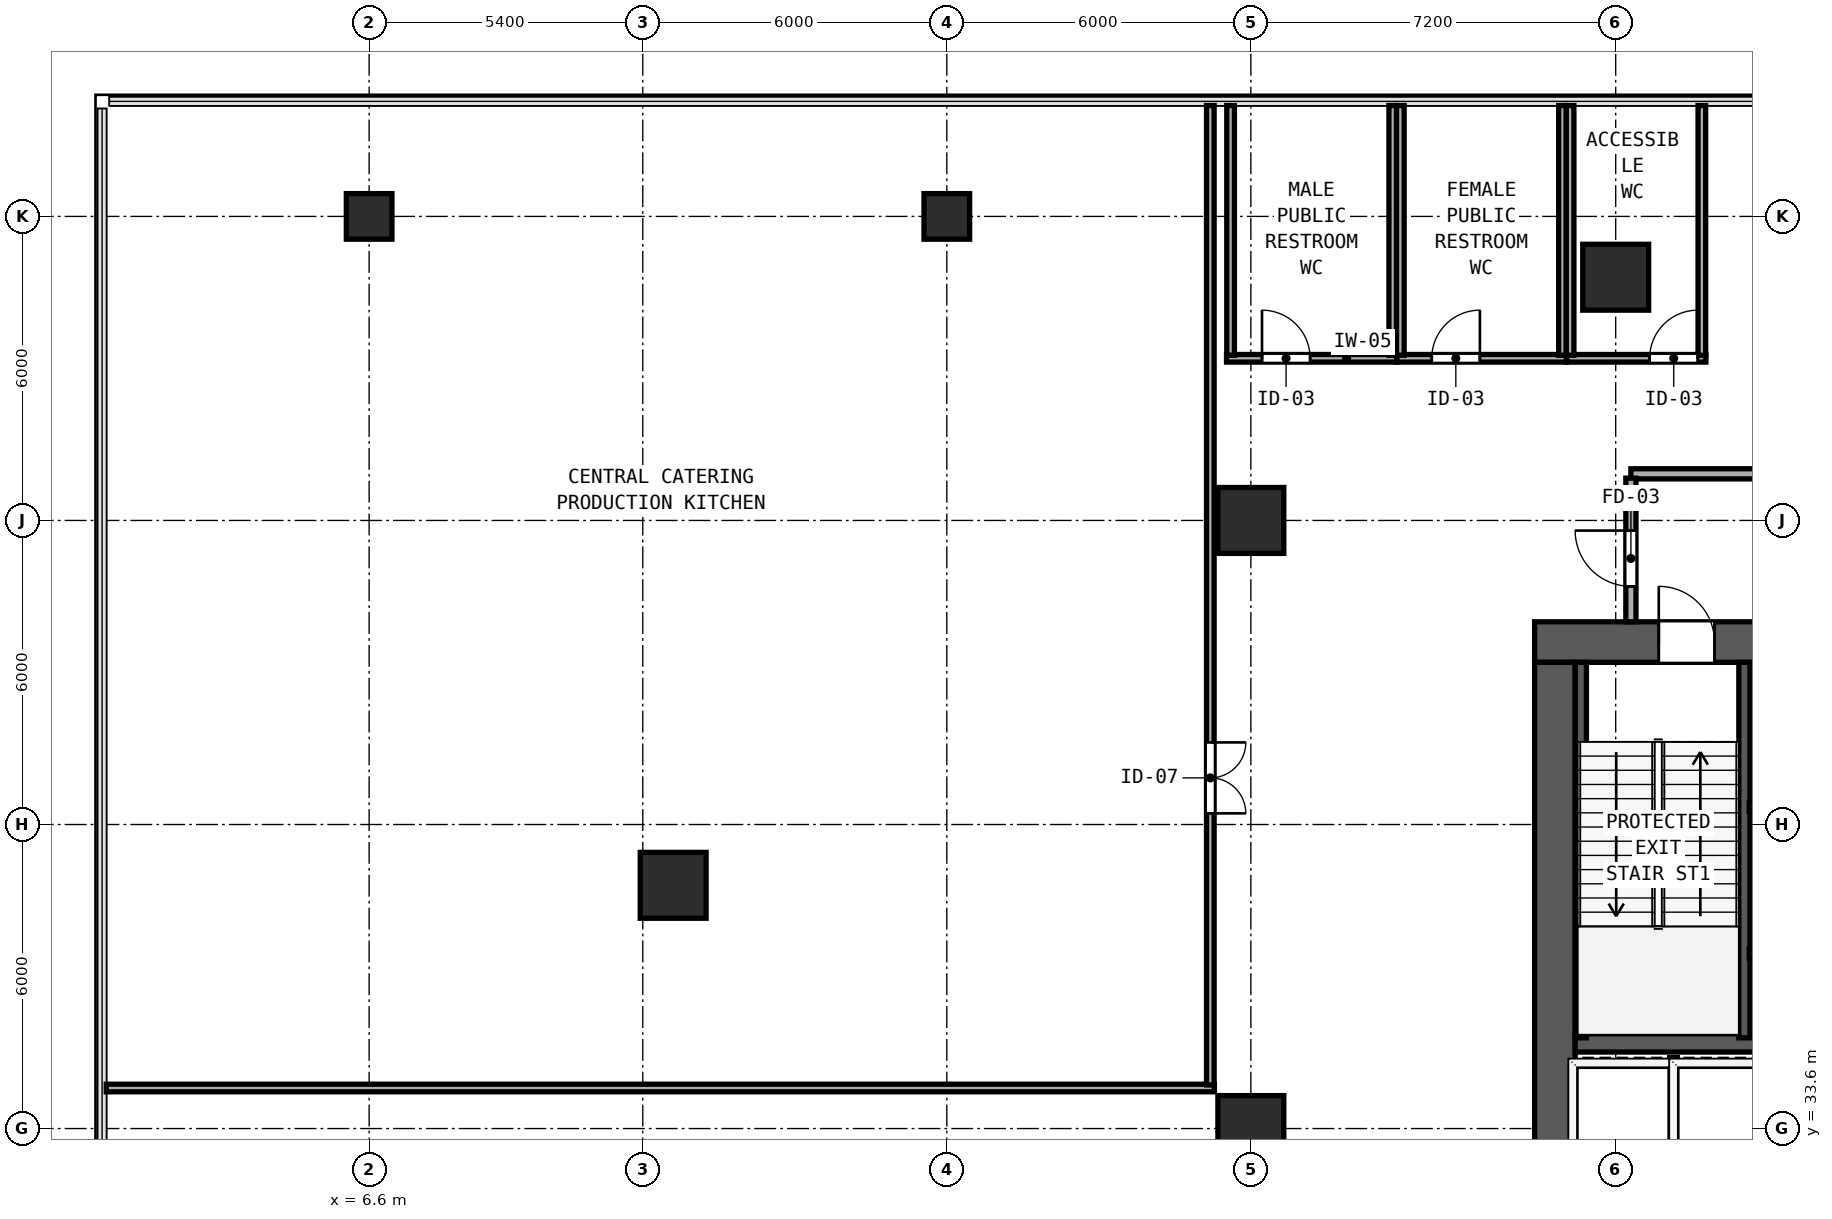
"""IFC4 building model, lengths in metres.
Left out: names, types, materials, properties, quantities, classifications, styles, units other than length and angle.
Written with IfcOpenShell. Run it as: python <this file> out.ifc"""

import sys

from ifc_helpers import new_model, si_unit, direction, frame, frame_2d, origin, origin_2d, place, context, subcontext, project, spatial, rectangle, hollow_rectangle, extrude, element, fill, save


model = new_model("IFC4")
c1 = context("Model", 3, precision=1e-05, world=origin(), true_north=direction((0.0, 1.0)))
c2 = subcontext(c1, "Body", "Model", "MODEL_VIEW")
j1 = project(units=[si_unit("LENGTHUNIT", "METRE"), si_unit("PLANEANGLEUNIT", "RADIAN")], contexts=[c1])
p1 = place(None, origin())
s1 = spatial("IfcSite", under=j1, at=p1, CompositionType="ELEMENT")
p2 = place(p1, origin())
s2 = spatial("IfcBuilding", under=s1, at=p2, CompositionType="ELEMENT")
p3 = place(p2, frame((0.0, 0.0, 5.4)))
s3 = spatial("IfcBuildingStorey", under=s2, at=p3, CompositionType="ELEMENT", Elevation=5.4)
p4 = place(p3, frame((29.6, 43.2, 0.0), z_axis=(0.0, 0.0, 1.0), x_axis=(1.0, 0.0, 0.0)))
e1 = element("IfcWall", 1, at=p4, inside=s3, PredefinedType="SHEAR", context=c2, shape_type="SweptSolid", body=[
    extrude(rectangle(XDim=17.6, YDim=0.8, at=frame_2d((8.8, 0.0))), origin(), (0.0, 0.0, 1.0), 4.56),
])
p5 = place(p4, frame((2.45, 0.0, 0.0)))
e2 = element("IfcOpeningElement", 2, at=p5, cuts=e1, PredefinedType="OPENING", context=c2, shape_type="SweptSolid", body=[
    extrude(rectangle(XDim=1.1, YDim=2.15, at=frame_2d((0.55, 1.075))), frame((0.0, 0.41, 0.0), z_axis=(0.0, -1.0, 0.0), x_axis=(1.0, 0.0, 0.0)), (0.0, 0.0, 1.0), 0.82),
])
p6 = place(p4, frame((7.56, 0.0, 0.0)))
e3 = element("IfcOpeningElement", 3, at=p6, cuts=e1, PredefinedType="OPENING", context=c2, shape_type="SweptSolid", body=[
    extrude(rectangle(XDim=1.1, YDim=2.15, at=frame_2d((0.55, 1.075))), frame((0.0, 0.41, 0.0), z_axis=(0.0, -1.0, 0.0), x_axis=(1.0, 0.0, 0.0)), (0.0, 0.0, 1.0), 0.82),
])
p7 = place(p4, frame((13.65, 0.0, 0.0)))
e4 = element("IfcOpeningElement", 4, at=p7, cuts=e1, PredefinedType="OPENING", context=c2, shape_type="SweptSolid", body=[
    extrude(rectangle(XDim=1.1, YDim=2.15, at=frame_2d((0.55, 1.075))), frame((0.0, 0.41, 0.0), z_axis=(0.0, -1.0, 0.0), x_axis=(1.0, 0.0, 0.0)), (0.0, 0.0, 1.0), 0.82),
])
p8 = place(p4, frame((4.78, 0.0, 0.0)))
e5 = element("IfcOpeningElement", 5, at=p8, cuts=e1, PredefinedType="OPENING", context=c2, shape_type="SweptSolid", body=[
    extrude(rectangle(XDim=1.1, YDim=2.2, at=frame_2d((0.55, 1.1))), frame((0.0, 0.41, 0.0), z_axis=(0.0, -1.0, 0.0), x_axis=(1.0, 0.0, 0.0)), (0.0, 0.0, 1.0), 0.82),
])
p9 = place(p4, frame((11.14, 0.0, 0.0)))
e6 = element("IfcOpeningElement", 6, at=p9, cuts=e1, PredefinedType="OPENING", context=c2, shape_type="SweptSolid", body=[
    extrude(rectangle(XDim=1.1, YDim=2.2, at=frame_2d((0.55, 1.1))), frame((0.0, 0.41, 0.0), z_axis=(0.0, -1.0, 0.0), x_axis=(1.0, 0.0, 0.0)), (0.0, 0.0, 1.0), 0.82),
])
p10 = place(p3, frame((30.0, 32.8, 0.0), z_axis=(0.0, 0.0, 1.0), x_axis=(0.0, 1.0, 0.0)))
e7 = element("IfcWall", 7, at=p10, inside=s3, PredefinedType="SHEAR", context=c2, shape_type="SweptSolid", body=[
    extrude(rectangle(XDim=10.0, YDim=0.8, at=frame_2d((5.0, 0.0))), origin(), (0.0, 0.0, 1.0), 4.56),
])
p11 = place(p3, frame((30.4, 35.29, 0.0), z_axis=(0.0, 0.0, 1.0), x_axis=(1.0, 0.0, 0.0)))
e8 = element("IfcWall", 8, at=p11, inside=s3, PredefinedType="SHEAR", context=c2, shape_type="SweptSolid", body=[
    extrude(rectangle(XDim=16.0, YDim=0.36, at=frame_2d((8.0, 0.0))), origin(), (0.0, 0.0, 1.0), 4.56),
])
p12 = place(p11, frame((4.95, 0.0, 0.0), z_axis=(0.0, 0.0, 1.0), x_axis=(-1.0, 0.0, 0.0)))
e9 = element("IfcOpeningElement", 9, at=p12, cuts=e8, PredefinedType="OPENING", context=c2, shape_type="SweptSolid", body=[
    extrude(rectangle(XDim=0.9, YDim=2.1, at=frame_2d((0.45, 1.05))), frame((0.0, 0.19, 0.0), z_axis=(0.0, -1.0, 0.0), x_axis=(1.0, 0.0, 0.0)), (0.0, 0.0, 1.0), 0.38),
])
p13 = place(p11, frame((12.01, 0.0, 0.0), z_axis=(0.0, 0.0, 1.0), x_axis=(-1.0, 0.0, 0.0)))
e10 = element("IfcOpeningElement", 10, at=p13, cuts=e8, PredefinedType="OPENING", context=c2, shape_type="SweptSolid", body=[
    extrude(rectangle(XDim=0.9, YDim=2.1, at=frame_2d((0.45, 1.05))), frame((0.0, 0.19, 0.0), z_axis=(0.0, -1.0, 0.0), x_axis=(1.0, 0.0, 0.0)), (0.0, 0.0, 1.0), 0.38),
])
for number, where, z_axis, x_axis in (
    (11, (30.512, 35.39, 0.0), (0.0, 0.0, 1.0), (0.0, 1.0, 0.0)),
    (12, (33.74, 35.39, 0.0), (0.0, 0.0, 1.0), (0.0, 1.0, 0.0)),
):
    element("IfcWall", number, at=place(p3, frame(where, z_axis=z_axis, x_axis=x_axis)), inside=s3, PredefinedType="SHEAR", context=c2, shape_type="SweptSolid", body=[
        extrude(rectangle(XDim=7.41, YDim=0.22, at=frame_2d((3.705, 0.0))), origin(), (0.0, 0.0, 1.0), 4.56),
    ])
for number, where, z_axis, x_axis in (
    (13, (24.0, 33.6, 0.0), (0.0, 0.0, 1.0), (1.0, 0.0, 0.0)),
    (14, (24.0, 45.6, 0.0), (0.0, 0.0, 1.0), (1.0, 0.0, 0.0)),
    (15, (31.2, 50.4, 0.0), (0.0, 0.0, 1.0), (1.0, 0.0, 0.0)),
    (16, (12.6, 38.4, 0.0), (0.0, 0.0, 1.0), (1.0, 0.0, 0.0)),
):
    element("IfcColumn", number, at=place(p3, frame(where, z_axis=z_axis, x_axis=x_axis)), inside=s3, PredefinedType="COLUMN", context=c2, shape_type="SweptSolid", body=[
        extrude(hollow_rectangle(XDim=1.3, YDim=1.3, WallThickness=0.048, at=origin_2d()), origin(), (0.0, 0.0, 1.0), 4.8),
    ])
for number, where, z_axis, x_axis in (
    (17, (6.6, 51.6, 0.0), (0.0, 0.0, 1.0), (1.0, 0.0, 0.0)),
    (18, (18.0, 51.6, 0.0), (0.0, 0.0, 1.0), (1.0, 0.0, 0.0)),
):
    element("IfcColumn", number, at=place(p3, frame(where, z_axis=z_axis, x_axis=x_axis)), inside=s3, PredefinedType="COLUMN", context=c2, shape_type="SweptSolid", body=[
        extrude(rectangle(XDim=0.9, YDim=0.9, at=origin_2d()), origin(), (0.0, 0.0, 1.0), 4.8),
    ])
p14 = place(p3, frame((31.5, 46.52, 0.0), z_axis=(0.0, 0.0, 1.0), x_axis=(1.0, 0.0, 0.0)))
e19 = element("IfcWall", 19, at=p14, inside=s3, PredefinedType="SOLIDWALL", context=c2, shape_type="SweptSolid", body=[
    extrude(rectangle(XDim=13.8, YDim=0.2, at=frame_2d((6.9, 0.0))), origin(), (0.0, 0.0, 1.0), 4.56),
])
p15 = place(p3, frame((31.5, 43.6, 0.0), z_axis=(0.0, 0.0, 1.0), x_axis=(0.0, 1.0, 0.0)))
e20 = element("IfcWall", 20, at=p15, inside=s3, PredefinedType="SOLIDWALL", context=c2, shape_type="SweptSolid", body=[
    extrude(rectangle(XDim=2.835, YDim=0.2, at=frame_2d((1.417, 0.0))), origin(), (0.0, 0.0, 1.0), 4.56),
])
p16 = place(p15, frame((1.8, 0.0, 0.0), z_axis=(0.0, 0.0, 1.0), x_axis=(-1.0, 0.0, 0.0)))
e21 = element("IfcOpeningElement", 21, at=p16, cuts=e20, PredefinedType="OPENING", context=c2, shape_type="SweptSolid", body=[
    extrude(rectangle(XDim=1.1, YDim=2.15, at=frame_2d((0.55, 1.075))), frame((0.0, 0.11, 0.0), z_axis=(0.0, -1.0, 0.0), x_axis=(1.0, 0.0, 0.0)), (0.0, 0.0, 1.0), 0.22),
])
p17 = place(p3, frame((33.835, 39.95, 0.0), z_axis=(0.0, 0.0, 1.0), x_axis=(1.0, 0.0, 0.0)))
e22 = element("IfcWall", 22, at=p17, inside=s3, PredefinedType="SOLIDWALL", context=c2, shape_type="SweptSolid", body=[
    extrude(rectangle(XDim=2.77, YDim=0.18, at=frame_2d((1.385, 0.0))), origin(), (0.0, 0.0, 1.0), 4.56),
])
p18 = place(p3, frame((33.835, 37.05, 0.0), z_axis=(0.0, 0.0, 1.0), x_axis=(1.0, 0.0, 0.0)))
e23 = element("IfcWall", 23, at=p18, inside=s3, PredefinedType="SOLIDWALL", context=c2, shape_type="SweptSolid", body=[
    extrude(rectangle(XDim=2.77, YDim=0.18, at=frame_2d((1.385, 0.0))), origin(), (0.0, 0.0, 1.0), 4.56),
])
p19 = place(p18, frame((1.945, 0.0, 0.0), z_axis=(0.0, 0.0, 1.0), x_axis=(-1.0, 0.0, 0.0)))
e24 = element("IfcOpeningElement", 24, at=p19, cuts=e23, PredefinedType="OPENING", context=c2, shape_type="SweptSolid", body=[
    extrude(rectangle(XDim=1.2, YDim=2.2, at=frame_2d((0.6, 1.1))), frame((0.0, 0.1, 0.0), z_axis=(0.0, -1.0, 0.0), x_axis=(1.0, 0.0, 0.0)), (0.0, 0.0, 1.0), 0.2),
])
p20 = place(p3, frame((32.34, 32.95, 0.0), z_axis=(0.0, 0.0, 1.0), x_axis=(0.0, 1.0, 0.0)))
e25 = element("IfcWall", 25, at=p20, inside=s3, PredefinedType="SOLIDWALL", context=c2, shape_type="SweptSolid", body=[
    extrude(rectangle(XDim=2.05, YDim=0.15, at=frame_2d((1.025, 0.0))), origin(), (0.0, 0.0, 1.0), 4.56),
])
p21 = place(p3, frame((23.52, 48.8, 0.0), z_axis=(0.0, 0.0, 1.0), x_axis=(1.0, 0.0, 0.0)))
e26 = element("IfcWall", 26, at=p21, inside=s3, PredefinedType="PARTITIONING", context=c2, shape_type="SweptSolid", body=[
    extrude(rectangle(XDim=3.36, YDim=0.15, at=frame_2d((1.68, 0.0))), origin(), (0.0, 0.0, 1.0), 4.56),
])
p22 = place(p21, frame((0.7, 0.0, 0.0)))
e27 = element("IfcOpeningElement", 27, at=p22, cuts=e26, PredefinedType="OPENING", context=c2, shape_type="SweptSolid", body=[
    extrude(rectangle(XDim=0.95, YDim=2.12, at=frame_2d((0.475, 1.06))), frame((0.0, 0.085, 0.0), z_axis=(0.0, -1.0, 0.0), x_axis=(1.0, 0.0, 0.0)), (0.0, 0.0, 1.0), 0.17),
])
for number, where, z_axis, x_axis in (
    (28, (23.6, 48.86, 0.0), (0.0, 0.0, 1.0), (0.0, 1.0, 0.0)),
    (29, (26.8, 48.86, 0.0), (0.0, 0.0, 1.0), (0.0, 1.0, 0.0)),
):
    element("IfcWall", number, at=place(p3, frame(where, z_axis=z_axis, x_axis=x_axis)), inside=s3, PredefinedType="PARTITIONING", context=c2, shape_type="SweptSolid", body=[
        extrude(rectangle(XDim=4.928, YDim=0.15, at=frame_2d((2.464, 0.0))), origin(), (0.0, 0.0, 1.0), 4.56),
    ])
p23 = place(p3, frame((26.882, 48.8, 0.0), z_axis=(0.0, 0.0, 1.0), x_axis=(1.0, 0.0, 0.0)))
e30 = element("IfcWall", 30, at=p23, inside=s3, PredefinedType="PARTITIONING", context=c2, shape_type="SweptSolid", body=[
    extrude(rectangle(XDim=3.348, YDim=0.15, at=frame_2d((1.674, 0.0))), origin(), (0.0, 0.0, 1.0), 4.56),
])
p24 = place(p23, frame((0.688, 0.0, 0.0)))
e31 = element("IfcOpeningElement", 31, at=p24, cuts=e30, PredefinedType="OPENING", context=c2, shape_type="SweptSolid", body=[
    extrude(rectangle(XDim=0.95, YDim=2.12, at=frame_2d((0.475, 1.06))), frame((0.0, 0.085, 0.0), z_axis=(0.0, -1.0, 0.0), x_axis=(1.0, 0.0, 0.0)), (0.0, 0.0, 1.0), 0.17),
])
for number, where, z_axis, x_axis in (
    (32, (26.95, 48.86, 0.0), (0.0, 0.0, 1.0), (0.0, 1.0, 0.0)),
    (33, (30.15, 48.86, 0.0), (0.0, 0.0, 1.0), (0.0, 1.0, 0.0)),
):
    element("IfcWall", number, at=place(p3, frame(where, z_axis=z_axis, x_axis=x_axis)), inside=s3, PredefinedType="PARTITIONING", context=c2, shape_type="SweptSolid", body=[
        extrude(rectangle(XDim=4.928, YDim=0.15, at=frame_2d((2.464, 0.0))), origin(), (0.0, 0.0, 1.0), 4.56),
    ])
p25 = place(p3, frame((30.232, 48.8, 0.0), z_axis=(0.0, 0.0, 1.0), x_axis=(1.0, 0.0, 0.0)))
e34 = element("IfcWall", 34, at=p25, inside=s3, PredefinedType="PARTITIONING", context=c2, shape_type="SweptSolid", body=[
    extrude(rectangle(XDim=2.748, YDim=0.15, at=frame_2d((1.374, 0.0))), origin(), (0.0, 0.0, 1.0), 4.56),
])
p26 = place(p25, frame((1.638, 0.0, 0.0)))
e35 = element("IfcOpeningElement", 35, at=p26, cuts=e34, PredefinedType="OPENING", context=c2, shape_type="SweptSolid", body=[
    extrude(rectangle(XDim=0.95, YDim=2.12, at=frame_2d((0.475, 1.06))), frame((0.0, 0.085, 0.0), z_axis=(0.0, -1.0, 0.0), x_axis=(1.0, 0.0, 0.0)), (0.0, 0.0, 1.0), 0.17),
])
for number, where, z_axis, x_axis in (
    (36, (30.3, 48.86, 0.0), (0.0, 0.0, 1.0), (0.0, 1.0, 0.0)),
    (37, (32.9, 48.86, 0.0), (0.0, 0.0, 1.0), (0.0, 1.0, 0.0)),
):
    element("IfcWall", number, at=place(p3, frame(where, z_axis=z_axis, x_axis=x_axis)), inside=s3, PredefinedType="PARTITIONING", context=c2, shape_type="SweptSolid", body=[
        extrude(rectangle(XDim=4.928, YDim=0.15, at=frame_2d((2.464, 0.0))), origin(), (0.0, 0.0, 1.0), 4.56),
    ])
p27 = place(p3, frame((1.412, 34.4, 0.0), z_axis=(0.0, 0.0, 1.0), x_axis=(1.0, 0.0, 0.0)))
e38 = element("IfcWall", 38, at=p27, inside=s3, PredefinedType="PARTITIONING", context=c2, shape_type="SweptSolid", body=[
    extrude(rectangle(XDim=21.868, YDim=0.15, at=frame_2d((10.934, 0.0))), origin(), (0.0, 0.0, 1.0), 4.56),
])
p28 = place(p3, frame((23.2, 34.46, 0.0), z_axis=(0.0, 0.0, 1.0), x_axis=(0.0, 1.0, 0.0)))
e39 = element("IfcWall", 39, at=p28, inside=s3, PredefinedType="PARTITIONING", context=c2, shape_type="SweptSolid", body=[
    extrude(rectangle(XDim=19.328, YDim=0.15, at=frame_2d((9.664, 0.0))), origin(), (0.0, 0.0, 1.0), 4.56),
])
p29 = place(p28, frame((6.76, 0.0, 0.0), z_axis=(0.0, 0.0, 1.0), x_axis=(-1.0, 0.0, 0.0)))
e40 = element("IfcOpeningElement", 40, at=p29, cuts=e39, PredefinedType="OPENING", context=c2, shape_type="SweptSolid", body=[
    extrude(rectangle(XDim=1.4, YDim=2.18, at=frame_2d((0.7, 1.09))), frame((0.0, 0.085, 0.0), z_axis=(0.0, -1.0, 0.0), x_axis=(1.0, 0.0, 0.0)), (0.0, 0.0, 1.0), 0.17),
])
p30 = place(p5, origin())
e41 = element("IfcDoor", 41, at=p30, inside=s3, OperationType="SINGLE_SWING_LEFT", PredefinedType="DOOR", context=c2, shape_type="SweptSolid", body=[
    extrude(rectangle(XDim=1.1, YDim=2.15, at=frame_2d((0.55, 1.075))), frame((0.0, 0.185, 0.0), z_axis=(0.0, -1.0, 0.0), x_axis=(1.0, 0.0, 0.0)), (0.0, 0.0, 1.0), 0.05),
])
fill(e2, e41)
p31 = place(p16, origin())
e42 = element("IfcDoor", 42, at=p31, inside=s3, OperationType="SINGLE_SWING_LEFT", PredefinedType="DOOR", context=c2, shape_type="SweptSolid", body=[
    extrude(rectangle(XDim=1.1, YDim=2.15, at=frame_2d((0.55, 1.075))), frame((0.0, 0.025, 0.0), z_axis=(0.0, -1.0, 0.0), x_axis=(1.0, 0.0, 0.0)), (0.0, 0.0, 1.0), 0.05),
])
fill(e21, e42)
p32 = place(p22, origin())
e43 = element("IfcDoor", 43, at=p32, inside=s3, OperationType="SINGLE_SWING_LEFT", PredefinedType="DOOR", context=c2, shape_type="SweptSolid", body=[
    extrude(rectangle(XDim=0.95, YDim=2.12, at=frame_2d((0.475, 1.06))), frame((0.0, 0.025, 0.0), z_axis=(0.0, -1.0, 0.0), x_axis=(1.0, 0.0, 0.0)), (0.0, 0.0, 1.0), 0.05),
])
fill(e27, e43)
p33 = place(p24, origin())
e44 = element("IfcDoor", 44, at=p33, inside=s3, OperationType="SINGLE_SWING_RIGHT", PredefinedType="DOOR", context=c2, shape_type="SweptSolid", body=[
    extrude(rectangle(XDim=0.95, YDim=2.12, at=frame_2d((0.475, 1.06))), frame((0.0, 0.025, 0.0), z_axis=(0.0, -1.0, 0.0), x_axis=(1.0, 0.0, 0.0)), (0.0, 0.0, 1.0), 0.05),
])
fill(e31, e44)
p34 = place(p26, origin())
e45 = element("IfcDoor", 45, at=p34, inside=s3, OperationType="SINGLE_SWING_RIGHT", PredefinedType="DOOR", context=c2, shape_type="SweptSolid", body=[
    extrude(rectangle(XDim=0.95, YDim=2.12, at=frame_2d((0.475, 1.06))), frame((0.0, 0.025, 0.0), z_axis=(0.0, -1.0, 0.0), x_axis=(1.0, 0.0, 0.0)), (0.0, 0.0, 1.0), 0.05),
])
fill(e35, e45)
p35 = place(p29, origin())
e46 = element("IfcDoor", 46, at=p35, inside=s3, OperationType="DOUBLE_DOOR_SINGLE_SWING", PredefinedType="DOOR", context=c2, shape_type="SweptSolid", body=[
    extrude(rectangle(XDim=1.4, YDim=2.18, at=frame_2d((0.7, 1.09))), frame((0.0, 0.025, 0.0), z_axis=(0.0, -1.0, 0.0), x_axis=(1.0, 0.0, 0.0)), (0.0, 0.0, 1.0), 0.05),
])
fill(e40, e46)
save(model, sys.argv[1])
